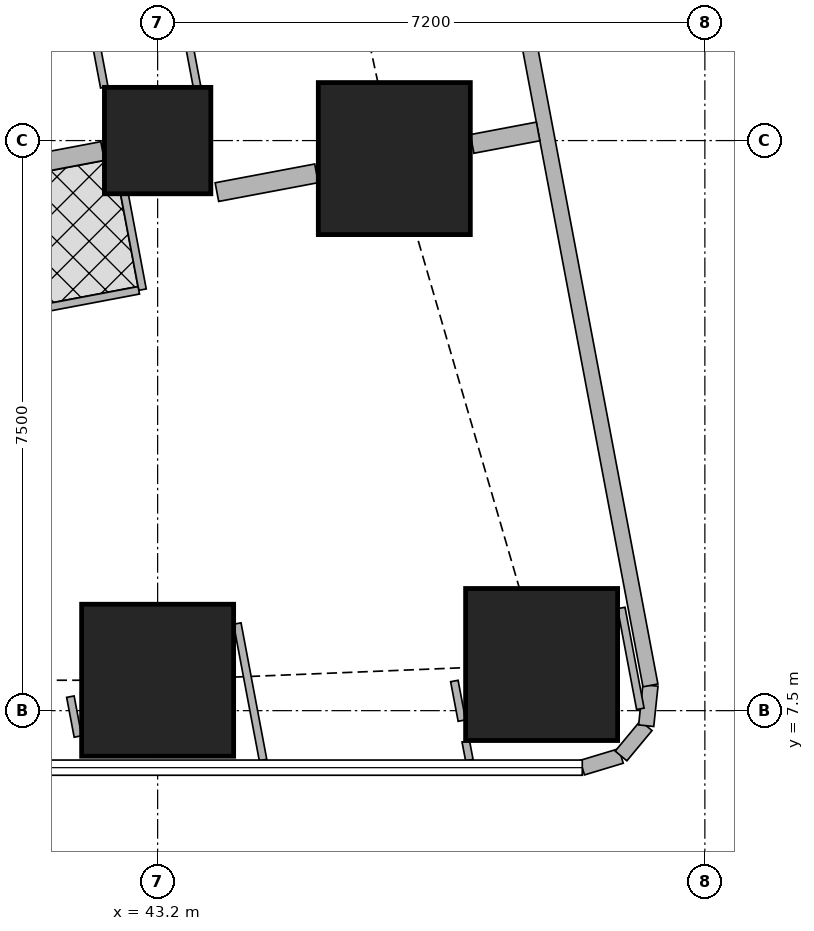
"""IFC4 building model, lengths in metres.
Left out: names, types, materials, properties, quantities, classifications, styles, units other than length and angle.
Written with IfcOpenShell. Run it as: python <this file> out.ifc"""

import sys

from ifc_helpers import new_model, si_unit, direction, frame, frame_2d, origin, origin_2d, place, context, subcontext, project, spatial, rectangle, extrude, element, fill, save


model = new_model("IFC4")
c1 = context("Model", 3, precision=1e-05, world=origin(), true_north=direction((0.0, 1.0)))
c2 = subcontext(c1, "Body", "Model", "MODEL_VIEW")
j1 = project(units=[si_unit("LENGTHUNIT", "METRE"), si_unit("PLANEANGLEUNIT", "RADIAN")], contexts=[c1])
p1 = place(None, origin())
s1 = spatial("IfcSite", under=j1, at=p1, CompositionType="ELEMENT")
p2 = place(p1, origin())
s2 = spatial("IfcBuilding", under=s1, at=p2, CompositionType="ELEMENT")
p3 = place(p2, frame((0.0, 0.0, 251.6)))
s3 = spatial("IfcBuildingStorey", under=s2, at=p3, CompositionType="ELEMENT", Elevation=251.6)
for number, where, z_axis, x_axis in (
    (1, (43.2, 7.9, 0.0), (0.0, 0.0, 1.0), (1.0, 0.0, 0.0)),
    (2, (48.252, 8.107, 0.0), (0.0, 0.0, 1.0), (1.0, 0.0, 0.0)),
):
    element("IfcColumn", number, at=place(p3, frame(where, z_axis=z_axis, x_axis=x_axis)), inside=s3, PredefinedType="COLUMN", context=c2, shape_type="SweptSolid", body=[
        extrude(rectangle(XDim=2.0, YDim=2.0, at=origin_2d()), origin(), (0.0, 0.0, 1.0), 3.75),
    ])
p4 = place(p3, frame((43.2, 15.0, 0.0), z_axis=(0.0, 0.0, 1.0), x_axis=(1.0, 0.0, 0.0)))
e3 = element("IfcColumn", 3, at=p4, inside=s3, PredefinedType="COLUMN", context=c2, shape_type="SweptSolid", body=[
    extrude(rectangle(XDim=1.4, YDim=1.4, at=origin_2d()), origin(), (0.0, 0.0, 1.0), 3.75),
])
p5 = place(p3, frame((46.314, 14.763, 0.0), z_axis=(0.0, 0.0, 1.0), x_axis=(1.0, 0.0, 0.0)))
e4 = element("IfcColumn", 4, at=p5, inside=s3, PredefinedType="COLUMN", context=c2, shape_type="SweptSolid", body=[
    extrude(rectangle(XDim=2.0, YDim=2.0, at=origin_2d()), origin(), (0.0, 0.0, 1.0), 3.75),
])
p6 = place(p3, frame((48.787, 6.75, 0.0), z_axis=(0.0, 0.0, 1.0), x_axis=(0.957282247819, 0.289155145225, 0.0)))
e5 = element("IfcWall", 5, at=p6, inside=s3, PredefinedType="SOLIDWALL", context=c2, shape_type="SweptSolid", body=[
    extrude(rectangle(XDim=0.533, YDim=0.2, at=frame_2d((0.266, 0.0))), origin(), (0.0, 0.0, 1.0), 3.5),
])
p7 = place(p3, frame((49.297, 6.904, 0.0), z_axis=(0.0, 0.0, 1.0), x_axis=(0.639255849474, 0.768994121508, 0.0)))
e6 = element("IfcWall", 6, at=p7, inside=s3, PredefinedType="SOLIDWALL", context=c2, shape_type="SweptSolid", body=[
    extrude(rectangle(XDim=0.518, YDim=0.2, at=frame_2d((0.259, 0.0))), origin(), (0.0, 0.0, 1.0), 3.5),
])
p8 = place(p3, frame((49.628, 7.302, 0.0), z_axis=(0.0, 0.0, 1.0), x_axis=(0.105352390132, 0.994434952068, 0.0)))
e7 = element("IfcWall", 7, at=p8, inside=s3, PredefinedType="SOLIDWALL", context=c2, shape_type="SweptSolid", body=[
    extrude(rectangle(XDim=0.533, YDim=0.2, at=frame_2d((0.267, 0.0))), origin(), (0.0, 0.0, 1.0), 3.5),
])
p9 = place(p3, frame((49.684, 7.832, 0.0), z_axis=(0.0, 0.0, 1.0), x_axis=(-0.185616669694, 0.982622232565, 0.0)))
e8 = element("IfcWall", 8, at=p9, inside=s3, PredefinedType="SOLIDWALL", context=c2, shape_type="SweptSolid", body=[
    extrude(rectangle(XDim=36.0, YDim=0.2, at=frame_2d((18.0, 0.0))), origin(), (0.0, 0.0, 1.0), 3.5),
])
p10 = place(p9, frame((2.518, 0.0, 0.9)))
e9 = element("IfcOpeningElement", 9, at=p10, cuts=e8, PredefinedType="OPENING", context=c2, shape_type="SweptSolid", body=[
    extrude(rectangle(XDim=2.4, YDim=1.5, at=frame_2d((1.2, 0.75))), frame((0.0, 0.11, 0.0), z_axis=(0.0, -1.0, 0.0), x_axis=(1.0, 0.0, 0.0)), (0.0, 0.0, 1.0), 0.22),
])
p11 = place(p9, frame((8.444, 0.0, 0.9)))
e10 = element("IfcOpeningElement", 10, at=p11, cuts=e8, PredefinedType="OPENING", context=c2, shape_type="SweptSolid", body=[
    extrude(rectangle(XDim=1.8, YDim=1.5, at=frame_2d((0.9, 0.75))), frame((0.0, 0.11, 0.0), z_axis=(0.0, -1.0, 0.0), x_axis=(1.0, 0.0, 0.0)), (0.0, 0.0, 1.0), 0.22),
])
p12 = place(p9, frame((12.261, 0.0, 0.9)))
e11 = element("IfcOpeningElement", 11, at=p12, cuts=e8, PredefinedType="OPENING", context=c2, shape_type="SweptSolid", body=[
    extrude(rectangle(XDim=1.8, YDim=1.5, at=frame_2d((0.9, 0.75))), frame((0.0, 0.11, 0.0), z_axis=(0.0, -1.0, 0.0), x_axis=(1.0, 0.0, 0.0)), (0.0, 0.0, 1.0), 0.22),
])
p13 = place(p9, frame((16.078, 0.0, 0.9)))
e12 = element("IfcOpeningElement", 12, at=p13, cuts=e8, PredefinedType="OPENING", context=c2, shape_type="SweptSolid", body=[
    extrude(rectangle(XDim=1.8, YDim=1.5, at=frame_2d((0.9, 0.75))), frame((0.0, 0.11, 0.0), z_axis=(0.0, -1.0, 0.0), x_axis=(1.0, 0.0, 0.0)), (0.0, 0.0, 1.0), 0.22),
])
p14 = place(p9, frame((19.894, 0.0, 0.9)))
e13 = element("IfcOpeningElement", 13, at=p14, cuts=e8, PredefinedType="OPENING", context=c2, shape_type="SweptSolid", body=[
    extrude(rectangle(XDim=1.8, YDim=1.5, at=frame_2d((0.9, 0.75))), frame((0.0, 0.11, 0.0), z_axis=(0.0, -1.0, 0.0), x_axis=(1.0, 0.0, 0.0)), (0.0, 0.0, 1.0), 0.22),
])
p15 = place(p9, frame((23.71, 0.0, 0.9)))
e14 = element("IfcOpeningElement", 14, at=p15, cuts=e8, PredefinedType="OPENING", context=c2, shape_type="SweptSolid", body=[
    extrude(rectangle(XDim=1.8, YDim=1.5, at=frame_2d((0.9, 0.75))), frame((0.0, 0.11, 0.0), z_axis=(0.0, -1.0, 0.0), x_axis=(1.0, 0.0, 0.0)), (0.0, 0.0, 1.0), 0.22),
])
p16 = place(p9, frame((27.526, 0.0, 0.9)))
e15 = element("IfcOpeningElement", 15, at=p16, cuts=e8, PredefinedType="OPENING", context=c2, shape_type="SweptSolid", body=[
    extrude(rectangle(XDim=1.8, YDim=1.5, at=frame_2d((0.9, 0.75))), frame((0.0, 0.11, 0.0), z_axis=(0.0, -1.0, 0.0), x_axis=(1.0, 0.0, 0.0)), (0.0, 0.0, 1.0), 0.22),
])
p17 = place(p9, frame((32.046, 0.0, 0.9)))
e16 = element("IfcOpeningElement", 16, at=p17, cuts=e8, PredefinedType="OPENING", context=c2, shape_type="SweptSolid", body=[
    extrude(rectangle(XDim=1.8, YDim=1.5, at=frame_2d((0.9, 0.75))), frame((0.0, 0.11, 0.0), z_axis=(0.0, -1.0, 0.0), x_axis=(1.0, 0.0, 0.0)), (0.0, 0.0, 1.0), 0.22),
])
p18 = place(p3, frame((44.248, 8.646, 0.0), z_axis=(0.0, 0.0, 1.0), x_axis=(0.185417594585, -0.982659816833, 0.0)))
e17 = element("IfcWall", 17, at=p18, inside=s3, PredefinedType="PARTITIONING", context=c2, shape_type="SweptSolid", body=[
    extrude(rectangle(XDim=1.828, YDim=0.1, at=frame_2d((0.914, 0.0))), origin(), (0.0, 0.0, 1.0), 2.05),
])
p19 = place(p3, frame((42.151, 7.16, 0.0), z_axis=(0.0, 0.0, 1.0), x_axis=(-0.185366164644, 0.982669519729, 0.0)))
e18 = element("IfcWall", 18, at=p19, inside=s3, PredefinedType="PARTITIONING", context=c2, shape_type="SweptSolid", body=[
    extrude(rectangle(XDim=0.533, YDim=0.1, at=frame_2d((0.267, 0.0))), origin(), (0.0, 0.0, 1.0), 2.5),
])
p20 = place(p3, frame((49.3, 8.851, 0.0), z_axis=(0.0, 0.0, 1.0), x_axis=(0.18581620423, -0.982584519645, 0.0)))
e19 = element("IfcWall", 19, at=p20, inside=s3, PredefinedType="PARTITIONING", context=c2, shape_type="SweptSolid", body=[
    extrude(rectangle(XDim=1.351, YDim=0.1, at=frame_2d((0.675, 0.0))), origin(), (0.0, 0.0, 1.0), 3.5),
])
p21 = place(p3, frame((47.301, 6.85, 0.0), z_axis=(0.0, 0.0, 1.0), x_axis=(-0.187513903188, 0.982261948826, 0.0)))
e20 = element("IfcWall", 20, at=p21, inside=s3, PredefinedType="PARTITIONING", context=c2, shape_type="SweptSolid", body=[
    extrude(rectangle(XDim=0.251, YDim=0.1, at=frame_2d((0.125, 0.0))), origin(), (0.0, 0.0, 1.0), 3.5),
])
p22 = place(p3, frame((47.203, 7.369, 0.0), z_axis=(0.0, 0.0, 1.0), x_axis=(-0.186456243114, 0.982463266185, 0.0)))
e21 = element("IfcWall", 21, at=p22, inside=s3, PredefinedType="PARTITIONING", context=c2, shape_type="SweptSolid", body=[
    extrude(rectangle(XDim=0.53, YDim=0.1, at=frame_2d((0.265, 0.0))), origin(), (0.0, 0.0, 1.0), 2.05),
])
p23 = place(p3, frame((43.311, 17.865, 0.0), z_axis=(0.0, 0.0, 1.0), x_axis=(0.185572140257, -0.982630643101, 0.0)))
e22 = element("IfcWall", 22, at=p23, inside=s3, PredefinedType="PARTITIONING", context=c2, shape_type="SweptSolid", body=[
    extrude(rectangle(XDim=2.193, YDim=0.1, at=frame_2d((1.097, 0.0))), origin(), (0.0, 0.0, 1.0), 3.5),
])
p24 = place(p23, frame((0.15, 0.0, 0.0)))
e23 = element("IfcOpeningElement", 23, at=p24, cuts=e22, PredefinedType="OPENING", context=c2, shape_type="SweptSolid", body=[
    extrude(rectangle(XDim=0.9, YDim=2.1, at=frame_2d((0.45, 1.05))), frame((0.0, 0.06, 0.0), z_axis=(0.0, -1.0, 0.0), x_axis=(1.0, 0.0, 0.0)), (0.0, 0.0, 1.0), 0.12),
])
p25 = place(p3, frame((42.123, 17.691, 0.0), z_axis=(0.0, 0.0, 1.0), x_axis=(0.185183804812, -0.98270390171, 0.0)))
e24 = element("IfcWall", 24, at=p25, inside=s3, PredefinedType="PARTITIONING", context=c2, shape_type="SweptSolid", body=[
    extrude(rectangle(XDim=2.025, YDim=0.1, at=frame_2d((1.012, 0.0))), origin(), (0.0, 0.0, 1.0), 3.5),
])
p26 = place(p3, frame((42.765, 14.29, 0.0), z_axis=(0.0, 0.0, 1.0), x_axis=(0.185446293138, -0.982654401283, 0.0)))
e25 = element("IfcWall", 25, at=p26, inside=s3, PredefinedType="PARTITIONING", context=c2, shape_type="SweptSolid", body=[
    extrude(rectangle(XDim=1.273, YDim=0.1, at=frame_2d((0.636, 0.0))), origin(), (0.0, 0.0, 1.0), 3.5),
])
p27 = place(p3, frame((42.952, 13.03, 0.0), z_axis=(0.0, 0.0, 1.0), x_axis=(-0.982585626838, -0.185810349366, 0.0)))
e26 = element("IfcWall", 26, at=p27, inside=s3, PredefinedType="PARTITIONING", context=c2, shape_type="SweptSolid", body=[
    extrude(rectangle(XDim=3.525, YDim=0.1, at=frame_2d((1.763, 0.0))), origin(), (0.0, 0.0, 1.0), 3.5),
])
p28 = place(p27, frame((1.299, 0.0, 0.0)))
e27 = element("IfcOpeningElement", 27, at=p28, cuts=e26, PredefinedType="OPENING", context=c2, shape_type="SweptSolid", body=[
    extrude(rectangle(XDim=0.9, YDim=2.1, at=frame_2d((0.45, 1.05))), frame((0.0, 0.06, 0.0), z_axis=(0.0, -1.0, 0.0), x_axis=(1.0, 0.0, 0.0)), (0.0, 0.0, 1.0), 0.12),
])
p29 = place(p3, frame((48.206, 15.12, 0.0), z_axis=(0.0, 0.0, 1.0), x_axis=(-0.982608419258, -0.185689780017, 0.0)))
e28 = element("IfcWall", 28, at=p29, inside=s3, PredefinedType="SOLIDWALL", context=c2, shape_type="SweptSolid", body=[
    extrude(rectangle(XDim=0.884, YDim=0.25, at=frame_2d((0.442, 0.0))), origin(), (0.0, 0.0, 1.0), 3.5),
])
p30 = place(p3, frame((45.29, 14.569, 0.0), z_axis=(0.0, 0.0, 1.0), x_axis=(-0.982676759201, -0.185327782391, 0.0)))
e29 = element("IfcWall", 29, at=p30, inside=s3, PredefinedType="SOLIDWALL", context=c2, shape_type="SweptSolid", body=[
    extrude(rectangle(XDim=1.333, YDim=0.25, at=frame_2d((0.667, 0.0))), origin(), (0.0, 0.0, 1.0), 3.5),
])
p31 = place(p3, frame((42.476, 14.863, 0.0), z_axis=(0.0, 0.0, 1.0), x_axis=(-0.982603567712, -0.185715450942, 0.0)))
e30 = element("IfcWall", 30, at=p31, inside=s3, PredefinedType="SOLIDWALL", context=c2, shape_type="SweptSolid", body=[
    extrude(rectangle(XDim=3.398, YDim=0.25, at=frame_2d((1.699, 0.0))), origin(), (0.0, 0.0, 1.0), 3.5),
])
p32 = place(p10, origin())
e31 = element("IfcWindow", 31, at=p32, inside=s3, PartitioningType="SINGLE_PANEL", PredefinedType="WINDOW", context=c2, shape_type="SweptSolid", body=[
    extrude(rectangle(XDim=2.4, YDim=1.5, at=frame_2d((1.2, 0.75))), frame((0.0, 0.03, 0.0), z_axis=(0.0, -1.0, 0.0), x_axis=(1.0, 0.0, 0.0)), (0.0, 0.0, 1.0), 0.06),
])
fill(e9, e31)
p33 = place(p11, origin())
e32 = element("IfcWindow", 32, at=p33, inside=s3, PartitioningType="SINGLE_PANEL", PredefinedType="WINDOW", context=c2, shape_type="SweptSolid", body=[
    extrude(rectangle(XDim=1.8, YDim=1.5, at=frame_2d((0.9, 0.75))), frame((0.0, 0.03, 0.0), z_axis=(0.0, -1.0, 0.0), x_axis=(1.0, 0.0, 0.0)), (0.0, 0.0, 1.0), 0.06),
])
fill(e10, e32)
save(model, sys.argv[1])
